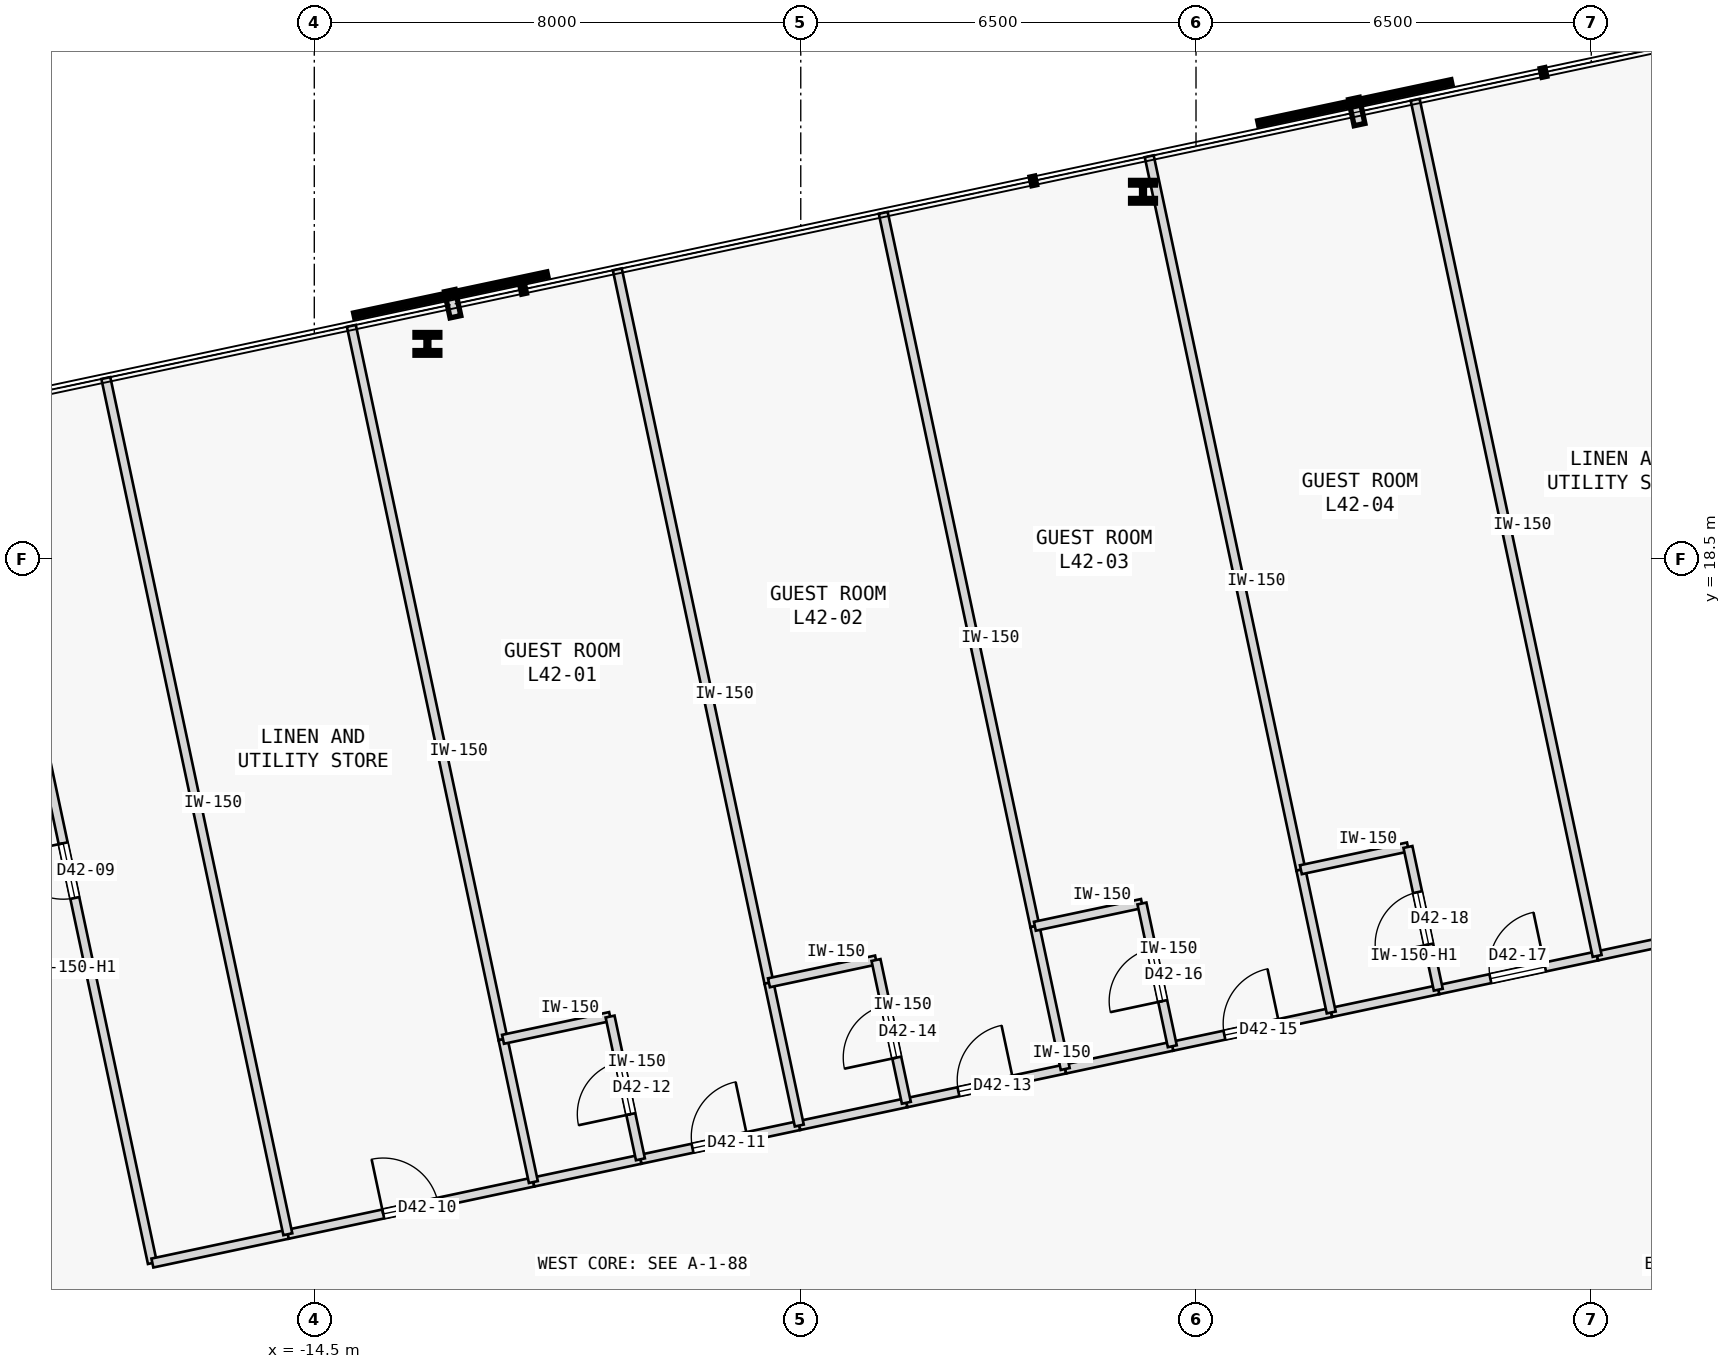
"""IFC4 building model, lengths in metres.
Left out: names, types, materials, properties, quantities, classifications, styles, units other than length and angle.
Written with IfcOpenShell. Run it as: python <this file> out.ifc"""

import sys

from ifc_helpers import new_model, si_unit, direction, frame, frame_2d, origin, origin_2d, place, context, subcontext, project, spatial, rectangle, i_section, extrude, element, fill, save


model = new_model("IFC4")
c1 = context("Model", 3, precision=1e-05, world=origin(), true_north=direction((0.0, 1.0)))
c2 = subcontext(c1, "Body", "Model", "MODEL_VIEW")
j1 = project(units=[si_unit("LENGTHUNIT", "METRE"), si_unit("PLANEANGLEUNIT", "RADIAN")], contexts=[c1])
p1 = place(None, origin())
s1 = spatial("IfcSite", under=j1, at=p1, CompositionType="ELEMENT")
p2 = place(p1, origin())
s2 = spatial("IfcBuilding", under=s1, at=p2, CompositionType="ELEMENT")
p3 = place(p2, frame((0.0, 0.0, 165.0)))
s3 = spatial("IfcBuildingStorey", under=s2, at=p3, CompositionType="ELEMENT", Elevation=165.0)
for number, where, z_axis, x_axis in (
    (1, (-0.872, 24.543, 0.0), (0.0, 0.0, 1.0), (1.0, 0.0, 0.0)),
    (2, (-12.64, 22.042, 0.0), (0.0, 0.0, 1.0), (1.0, 0.0, 0.0)),
):
    element("IfcColumn", number, at=place(p3, frame(where, z_axis=z_axis, x_axis=x_axis)), inside=s3, PredefinedType="COLUMN", context=c2, shape_type="SweptSolid", body=[
        extrude(i_section(OverallWidth=0.409, OverallDepth=0.374, WebThickness=0.048, FlangeThickness=0.077, FilletRadius=0.015, at=origin_2d()), origin(), (0.0, 0.0, 1.0), 3.4),
    ])
p4 = place(p3, frame((-17.162, 6.926, 0.0), z_axis=(0.0, 0.0, 1.0), x_axis=(-0.207911421929, 0.978147657888, 0.0)))
e3 = element("IfcWall", 3, at=p4, inside=s3, PredefinedType="PARTITIONING", context=c2, shape_type="SweptSolid", body=[
    extrude(rectangle(XDim=13.195, YDim=0.15, at=frame_2d((6.598, 0.0))), origin(), (0.0, 0.0, 1.0), 2.725),
])
p5 = place(p4, frame((6.137, 0.0, 0.0)))
e4 = element("IfcOpeningElement", 4, at=p5, cuts=e3, PredefinedType="OPENING", context=c2, shape_type="SweptSolid", body=[
    extrude(rectangle(XDim=0.92, YDim=2.15, at=frame_2d((0.46, 1.075))), frame((0.0, 0.085, 0.0), z_axis=(0.0, -1.0, 0.0), x_axis=(1.0, 0.0, 0.0)), (0.0, 0.0, 1.0), 0.17),
])
p6 = place(p3, frame((-17.162, 6.926, 0.0), z_axis=(0.0, 0.0, 1.0), x_axis=(0.978124500572, 0.208020338863, 0.0)))
e5 = element("IfcWall", 5, at=p6, inside=s3, PredefinedType="PARTITIONING", context=c2, shape_type="SweptSolid", body=[
    extrude(rectangle(XDim=2.277, YDim=0.15, at=frame_2d((1.138, 0.0))), origin(), (0.0, 0.0, 1.0), 3.175),
])
p7 = place(p3, frame((-14.935, 7.399, 0.0), z_axis=(0.0, 0.0, 1.0), x_axis=(0.978153289129, 0.20788492722, 0.0)))
e6 = element("IfcWall", 6, at=p7, inside=s3, PredefinedType="PARTITIONING", context=c2, shape_type="SweptSolid", body=[
    extrude(rectangle(XDim=4.128, YDim=0.15, at=frame_2d((2.064, 0.0))), origin(), (0.0, 0.0, 1.0), 3.175),
])
p8 = place(p7, frame((1.604, 0.0, 0.0)))
e7 = element("IfcOpeningElement", 7, at=p8, cuts=e6, PredefinedType="OPENING", context=c2, shape_type="SweptSolid", body=[
    extrude(rectangle(XDim=0.92, YDim=2.15, at=frame_2d((0.46, 1.075))), frame((0.0, 0.085, 0.0), z_axis=(0.0, -1.0, 0.0), x_axis=(1.0, 0.0, 0.0)), (0.0, 0.0, 1.0), 0.17),
])
p9 = place(p3, frame((-9.137, 8.632, 0.0), z_axis=(0.0, 0.0, 1.0), x_axis=(0.978158153975, 0.207862035524, 0.0)))
e8 = element("IfcWall", 8, at=p9, inside=s3, PredefinedType="PARTITIONING", context=c2, shape_type="SweptSolid", body=[
    extrude(rectangle(XDim=2.671, YDim=0.15, at=frame_2d((1.335, 0.0))), origin(), (0.0, 0.0, 1.0), 3.175),
])
p10 = place(p9, frame((0.875, 0.0, 0.0)))
e9 = element("IfcOpeningElement", 9, at=p10, cuts=e8, PredefinedType="OPENING", context=c2, shape_type="SweptSolid", body=[
    extrude(rectangle(XDim=0.92, YDim=2.15, at=frame_2d((0.46, 1.075))), frame((0.0, 0.085, 0.0), z_axis=(0.0, -1.0, 0.0), x_axis=(1.0, 0.0, 0.0)), (0.0, 0.0, 1.0), 0.17),
])
p11 = place(p3, frame((-10.897, 8.258, 0.0), z_axis=(0.0, 0.0, 1.0), x_axis=(0.978146440129, 0.207917150959, 0.0)))
e10 = element("IfcWall", 10, at=p11, inside=s3, PredefinedType="PARTITIONING", context=c2, shape_type="SweptSolid", body=[
    extrude(rectangle(XDim=1.8, YDim=0.15, at=frame_2d((0.9, 0.0))), origin(), (0.0, 0.0, 1.0), 3.175),
])
p12 = place(p3, frame((-4.763, 9.561, 0.0), z_axis=(0.0, 0.0, 1.0), x_axis=(0.978139565144, 0.207949491702, 0.0)))
e11 = element("IfcWall", 11, at=p12, inside=s3, PredefinedType="PARTITIONING", context=c2, shape_type="SweptSolid", body=[
    extrude(rectangle(XDim=2.671, YDim=0.15, at=frame_2d((1.335, 0.0))), origin(), (0.0, 0.0, 1.0), 3.175),
])
p13 = place(p12, frame((0.875, 0.0, 0.0)))
e12 = element("IfcOpeningElement", 12, at=p13, cuts=e11, PredefinedType="OPENING", context=c2, shape_type="SweptSolid", body=[
    extrude(rectangle(XDim=0.92, YDim=2.15, at=frame_2d((0.46, 1.075))), frame((0.0, 0.085, 0.0), z_axis=(0.0, -1.0, 0.0), x_axis=(1.0, 0.0, 0.0)), (0.0, 0.0, 1.0), 0.17),
])
p14 = place(p3, frame((-6.524, 9.187, 0.0), z_axis=(0.0, 0.0, 1.0), x_axis=(0.978146440129, 0.207917150959, 0.0)))
e13 = element("IfcWall", 13, at=p14, inside=s3, PredefinedType="PARTITIONING", context=c2, shape_type="SweptSolid", body=[
    extrude(rectangle(XDim=1.8, YDim=0.15, at=frame_2d((0.9, 0.0))), origin(), (0.0, 0.0, 1.0), 3.175),
])
p15 = place(p3, frame((-0.39, 10.491, 0.0), z_axis=(0.0, 0.0, 1.0), x_axis=(0.978155367406, 0.207875148141, 0.0)))
e14 = element("IfcWall", 14, at=p15, inside=s3, PredefinedType="PARTITIONING", context=c2, shape_type="SweptSolid", body=[
    extrude(rectangle(XDim=2.672, YDim=0.15, at=frame_2d((1.336, 0.0))), origin(), (0.0, 0.0, 1.0), 3.175),
])
p16 = place(p15, frame((0.876, 0.0, 0.0)))
e15 = element("IfcOpeningElement", 15, at=p16, cuts=e14, PredefinedType="OPENING", context=c2, shape_type="SweptSolid", body=[
    extrude(rectangle(XDim=0.92, YDim=2.15, at=frame_2d((0.46, 1.075))), frame((0.0, 0.085, 0.0), z_axis=(0.0, -1.0, 0.0), x_axis=(1.0, 0.0, 0.0)), (0.0, 0.0, 1.0), 0.17),
])
p17 = place(p3, frame((-2.151, 10.117, 0.0), z_axis=(0.0, 0.0, 1.0), x_axis=(0.978146440129, 0.207917150959, 0.0)))
e16 = element("IfcWall", 16, at=p17, inside=s3, PredefinedType="PARTITIONING", context=c2, shape_type="SweptSolid", body=[
    extrude(rectangle(XDim=1.8, YDim=0.15, at=frame_2d((0.9, 0.0))), origin(), (0.0, 0.0, 1.0), 3.175),
])
p18 = place(p3, frame((3.984, 11.421, 0.0), z_axis=(0.0, 0.0, 1.0), x_axis=(0.978139565144, 0.207949491702, 0.0)))
e17 = element("IfcWall", 17, at=p18, inside=s3, PredefinedType="PARTITIONING", context=c2, shape_type="SweptSolid", body=[
    extrude(rectangle(XDim=2.671, YDim=0.15, at=frame_2d((1.335, 0.0))), origin(), (0.0, 0.0, 1.0), 3.175),
])
p19 = place(p18, frame((0.875, 0.0, 0.0)))
e18 = element("IfcOpeningElement", 18, at=p19, cuts=e17, PredefinedType="OPENING", context=c2, shape_type="SweptSolid", body=[
    extrude(rectangle(XDim=0.92, YDim=2.15, at=frame_2d((0.46, 1.075))), frame((0.0, 0.085, 0.0), z_axis=(0.0, -1.0, 0.0), x_axis=(1.0, 0.0, 0.0)), (0.0, 0.0, 1.0), 0.17),
])
p20 = place(p3, frame((2.223, 11.046, 0.0), z_axis=(0.0, 0.0, 1.0), x_axis=(0.978146440129, 0.207917150959, 0.0)))
e19 = element("IfcWall", 19, at=p20, inside=s3, PredefinedType="PARTITIONING", context=c2, shape_type="SweptSolid", body=[
    extrude(rectangle(XDim=1.8, YDim=0.15, at=frame_2d((0.9, 0.0))), origin(), (0.0, 0.0, 1.0), 3.175),
])
p21 = place(p3, frame((6.597, 11.976, 0.0), z_axis=(0.0, 0.0, 1.0), x_axis=(0.978155092113, 0.207876443525, 0.0)))
e20 = element("IfcWall", 20, at=p21, inside=s3, PredefinedType="PARTITIONING", context=c2, shape_type="SweptSolid", body=[
    extrude(rectangle(XDim=4.127, YDim=0.15, at=frame_2d((2.063, 0.0))), origin(), (0.0, 0.0, 1.0), 3.175),
])
p22 = place(p21, frame((1.604, 0.0, 0.0)))
e21 = element("IfcOpeningElement", 21, at=p22, cuts=e20, PredefinedType="OPENING", context=c2, shape_type="SweptSolid", body=[
    extrude(rectangle(XDim=0.92, YDim=2.15, at=frame_2d((0.46, 1.075))), frame((0.0, 0.085, 0.0), z_axis=(0.0, -1.0, 0.0), x_axis=(1.0, 0.0, 0.0)), (0.0, 0.0, 1.0), 0.17),
])
p23 = place(p3, frame((-18.207, 1.74, 0.0), z_axis=(0.0, 0.0, 1.0), x_axis=(-0.20793874598, 0.97814184959, 0.0)))
e22 = element("IfcWall", 22, at=p23, inside=s3, PredefinedType="PARTITIONING", context=c2, shape_type="SweptSolid", body=[
    extrude(rectangle(XDim=4.855, YDim=0.15, at=frame_2d((2.427, 0.0))), origin(), (0.0, 0.0, 1.0), 3.175),
])
p24 = place(p23, frame((1.952, 0.0, 0.0)))
e23 = element("IfcOpeningElement", 23, at=p24, cuts=e22, PredefinedType="OPENING", context=c2, shape_type="SweptSolid", body=[
    extrude(rectangle(XDim=0.95, YDim=2.15, at=frame_2d((0.475, 1.075))), frame((0.0, 0.085, 0.0), z_axis=(0.0, -1.0, 0.0), x_axis=(1.0, 0.0, 0.0)), (0.0, 0.0, 1.0), 0.17),
])
p25 = place(p3, frame((-14.935, 7.399, 0.0), z_axis=(0.0, 0.0, 1.0), x_axis=(-0.207899121568, 0.978150272326, 0.0)))
e24 = element("IfcWall", 24, at=p25, inside=s3, PredefinedType="PARTITIONING", context=c2, shape_type="SweptSolid", body=[
    extrude(rectangle(XDim=14.395, YDim=0.15, at=frame_2d((7.197, 0.0))), origin(), (0.0, 0.0, 1.0), 3.175),
])
p26 = place(p3, frame((-11.396, 10.605, 0.0), z_axis=(0.0, 0.0, 1.0), x_axis=(-0.207910848762, 0.978147779718, 0.0)))
e25 = element("IfcWall", 25, at=p26, inside=s3, PredefinedType="PARTITIONING", context=c2, shape_type="SweptSolid", body=[
    extrude(rectangle(XDim=11.995, YDim=0.15, at=frame_2d((5.998, 0.0))), origin(), (0.0, 0.0, 1.0), 3.175),
])
p27 = place(p3, frame((-10.897, 8.258, 0.0), z_axis=(0.0, 0.0, 1.0), x_axis=(-0.207937840262, 0.978142042133, 0.0)))
e26 = element("IfcWall", 26, at=p27, inside=s3, PredefinedType="PARTITIONING", context=c2, shape_type="SweptSolid", body=[
    extrude(rectangle(XDim=2.4, YDim=0.15, at=frame_2d((1.2, 0.0))), origin(), (0.0, 0.0, 1.0), 3.175),
])
p28 = place(p3, frame((-11.396, 10.605, 0.0), z_axis=(0.0, 0.0, 1.0), x_axis=(0.978118849246, 0.208046909975, 0.0)))
e27 = element("IfcWall", 27, at=p28, inside=s3, PredefinedType="PARTITIONING", context=c2, shape_type="SweptSolid", body=[
    extrude(rectangle(XDim=1.8, YDim=0.15, at=frame_2d((0.9, 0.0))), origin(), (0.0, 0.0, 1.0), 3.175),
])
p29 = place(p3, frame((-9.137, 8.632, 0.0), z_axis=(0.0, 0.0, 1.0), x_axis=(-0.207917150959, 0.978146440129, 0.0)))
e28 = element("IfcWall", 28, at=p29, inside=s3, PredefinedType="PARTITIONING", context=c2, shape_type="SweptSolid", body=[
    extrude(rectangle(XDim=2.4, YDim=0.15, at=frame_2d((1.2, 0.0))), origin(), (0.0, 0.0, 1.0), 3.175),
])
p30 = place(p29, frame((0.76, 0.0, 0.0)))
e29 = element("IfcOpeningElement", 29, at=p30, cuts=e28, PredefinedType="OPENING", context=c2, shape_type="SweptSolid", body=[
    extrude(rectangle(XDim=0.88, YDim=2.15, at=frame_2d((0.44, 1.075))), frame((0.0, 0.085, 0.0), z_axis=(0.0, -1.0, 0.0), x_axis=(1.0, 0.0, 0.0)), (0.0, 0.0, 1.0), 0.17),
])
p31 = place(p3, frame((-7.023, 11.535, 0.0), z_axis=(0.0, 0.0, 1.0), x_axis=(-0.207910848762, 0.978147779718, 0.0)))
e30 = element("IfcWall", 30, at=p31, inside=s3, PredefinedType="PARTITIONING", context=c2, shape_type="SweptSolid", body=[
    extrude(rectangle(XDim=11.995, YDim=0.15, at=frame_2d((5.998, 0.0))), origin(), (0.0, 0.0, 1.0), 3.175),
])
p32 = place(p3, frame((-6.524, 9.187, 0.0), z_axis=(0.0, 0.0, 1.0), x_axis=(-0.207917150959, 0.978146440129, 0.0)))
e31 = element("IfcWall", 31, at=p32, inside=s3, PredefinedType="PARTITIONING", context=c2, shape_type="SweptSolid", body=[
    extrude(rectangle(XDim=2.4, YDim=0.15, at=frame_2d((1.2, 0.0))), origin(), (0.0, 0.0, 1.0), 3.175),
])
p33 = place(p3, frame((-7.023, 11.535, 0.0), z_axis=(0.0, 0.0, 1.0), x_axis=(0.978146440129, 0.207917150959, 0.0)))
e32 = element("IfcWall", 32, at=p33, inside=s3, PredefinedType="PARTITIONING", context=c2, shape_type="SweptSolid", body=[
    extrude(rectangle(XDim=1.8, YDim=0.15, at=frame_2d((0.9, 0.0))), origin(), (0.0, 0.0, 1.0), 3.175),
])
p34 = place(p3, frame((-4.763, 9.561, 0.0), z_axis=(0.0, 0.0, 1.0), x_axis=(-0.207917150959, 0.978146440129, 0.0)))
e33 = element("IfcWall", 33, at=p34, inside=s3, PredefinedType="PARTITIONING", context=c2, shape_type="SweptSolid", body=[
    extrude(rectangle(XDim=2.4, YDim=0.15, at=frame_2d((1.2, 0.0))), origin(), (0.0, 0.0, 1.0), 3.175),
])
p35 = place(p34, frame((0.76, 0.0, 0.0)))
e34 = element("IfcOpeningElement", 34, at=p35, cuts=e33, PredefinedType="OPENING", context=c2, shape_type="SweptSolid", body=[
    extrude(rectangle(XDim=0.88, YDim=2.15, at=frame_2d((0.44, 1.075))), frame((0.0, 0.085, 0.0), z_axis=(0.0, -1.0, 0.0), x_axis=(1.0, 0.0, 0.0)), (0.0, 0.0, 1.0), 0.17),
])
p36 = place(p3, frame((-2.65, 12.464, 0.0), z_axis=(0.0, 0.0, 1.0), x_axis=(-0.207914988081, 0.978146899873, 0.0)))
e35 = element("IfcWall", 35, at=p36, inside=s3, PredefinedType="PARTITIONING", context=c2, shape_type="SweptSolid", body=[
    extrude(rectangle(XDim=11.995, YDim=0.15, at=frame_2d((5.998, 0.0))), origin(), (0.0, 0.0, 1.0), 3.175),
])
p37 = place(p3, frame((-2.151, 10.117, 0.0), z_axis=(0.0, 0.0, 1.0), x_axis=(-0.207917150959, 0.978146440129, 0.0)))
e36 = element("IfcWall", 36, at=p37, inside=s3, PredefinedType="PARTITIONING", context=c2, shape_type="SweptSolid", body=[
    extrude(rectangle(XDim=2.4, YDim=0.15, at=frame_2d((1.2, 0.0))), origin(), (0.0, 0.0, 1.0), 3.175),
])
p38 = place(p3, frame((-2.65, 12.464, 0.0), z_axis=(0.0, 0.0, 1.0), x_axis=(0.978174015353, 0.207787380965, 0.0)))
e37 = element("IfcWall", 37, at=p38, inside=s3, PredefinedType="PARTITIONING", context=c2, shape_type="SweptSolid", body=[
    extrude(rectangle(XDim=1.8, YDim=0.15, at=frame_2d((0.9, 0.0))), origin(), (0.0, 0.0, 1.0), 3.175),
])
p39 = place(p3, frame((-0.39, 10.491, 0.0), z_axis=(0.0, 0.0, 1.0), x_axis=(-0.207937840262, 0.978142042133, 0.0)))
e38 = element("IfcWall", 38, at=p39, inside=s3, PredefinedType="PARTITIONING", context=c2, shape_type="SweptSolid", body=[
    extrude(rectangle(XDim=2.4, YDim=0.15, at=frame_2d((1.2, 0.0))), origin(), (0.0, 0.0, 1.0), 3.175),
])
p40 = place(p39, frame((0.76, 0.0, 0.0)))
e39 = element("IfcOpeningElement", 39, at=p40, cuts=e38, PredefinedType="OPENING", context=c2, shape_type="SweptSolid", body=[
    extrude(rectangle(XDim=0.88, YDim=2.15, at=frame_2d((0.44, 1.075))), frame((0.0, 0.085, 0.0), z_axis=(0.0, -1.0, 0.0), x_axis=(1.0, 0.0, 0.0)), (0.0, 0.0, 1.0), 0.17),
])
p41 = place(p3, frame((1.725, 13.394, 0.0), z_axis=(0.0, 0.0, 1.0), x_axis=(-0.207910848762, 0.978147779718, 0.0)))
e40 = element("IfcWall", 40, at=p41, inside=s3, PredefinedType="PARTITIONING", context=c2, shape_type="SweptSolid", body=[
    extrude(rectangle(XDim=11.995, YDim=0.15, at=frame_2d((5.998, 0.0))), origin(), (0.0, 0.0, 1.0), 3.175),
])
p42 = place(p3, frame((2.223, 11.046, 0.0), z_axis=(0.0, 0.0, 1.0), x_axis=(-0.207819824493, 0.978167123015, 0.0)))
e41 = element("IfcWall", 41, at=p42, inside=s3, PredefinedType="PARTITIONING", context=c2, shape_type="SweptSolid", body=[
    extrude(rectangle(XDim=2.4, YDim=0.15, at=frame_2d((1.2, 0.0))), origin(), (0.0, 0.0, 1.0), 3.175),
])
p43 = place(p3, frame((1.725, 13.394, 0.0), z_axis=(0.0, 0.0, 1.0), x_axis=(0.978140575842, 0.207944737591, 0.0)))
e42 = element("IfcWall", 42, at=p43, inside=s3, PredefinedType="PARTITIONING", context=c2, shape_type="SweptSolid", body=[
    extrude(rectangle(XDim=1.8, YDim=0.15, at=frame_2d((0.9, 0.0))), origin(), (0.0, 0.0, 1.0), 3.175),
])
p44 = place(p3, frame((3.984, 11.421, 0.0), z_axis=(0.0, 0.0, 1.0), x_axis=(-0.207917150959, 0.978146440129, 0.0)))
e43 = element("IfcWall", 43, at=p44, inside=s3, PredefinedType="PARTITIONING", context=c2, shape_type="SweptSolid", body=[
    extrude(rectangle(XDim=2.4, YDim=0.15, at=frame_2d((1.2, 0.0))), origin(), (0.0, 0.0, 1.0), 2.725),
])
p45 = place(p44, frame((0.76, 0.0, 0.0)))
e44 = element("IfcOpeningElement", 44, at=p45, cuts=e43, PredefinedType="OPENING", context=c2, shape_type="SweptSolid", body=[
    extrude(rectangle(XDim=0.88, YDim=2.15, at=frame_2d((0.44, 1.075))), frame((0.0, 0.085, 0.0), z_axis=(0.0, -1.0, 0.0), x_axis=(1.0, 0.0, 0.0)), (0.0, 0.0, 1.0), 0.17),
])
p46 = place(p3, frame((6.597, 11.976, 0.0), z_axis=(0.0, 0.0, 1.0), x_axis=(-0.207899121568, 0.978150272326, 0.0)))
e45 = element("IfcWall", 45, at=p46, inside=s3, PredefinedType="PARTITIONING", context=c2, shape_type="SweptSolid", body=[
    extrude(rectangle(XDim=14.395, YDim=0.15, at=frame_2d((7.197, 0.0))), origin(), (0.0, 0.0, 1.0), 3.175),
])
p47 = place(p5, origin())
e46 = element("IfcDoor", 46, at=p47, inside=s3, OperationType="SINGLE_SWING_RIGHT", PredefinedType="DOOR", context=c2, shape_type="SweptSolid", body=[
    extrude(rectangle(XDim=0.92, YDim=2.15, at=frame_2d((0.46, 1.075))), frame((0.0, 0.025, 0.0), z_axis=(0.0, -1.0, 0.0), x_axis=(1.0, 0.0, 0.0)), (0.0, 0.0, 1.0), 0.05),
])
fill(e4, e46)
p48 = place(p8, origin())
e47 = element("IfcDoor", 47, at=p48, inside=s3, OperationType="SINGLE_SWING_LEFT", PredefinedType="DOOR", context=c2, shape_type="SweptSolid", body=[
    extrude(rectangle(XDim=0.92, YDim=2.15, at=frame_2d((0.46, 1.075))), frame((0.0, 0.025, 0.0), z_axis=(0.0, -1.0, 0.0), x_axis=(1.0, 0.0, 0.0)), (0.0, 0.0, 1.0), 0.05),
])
fill(e7, e47)
p49 = place(p10, origin())
e48 = element("IfcDoor", 48, at=p49, inside=s3, OperationType="SINGLE_SWING_RIGHT", PredefinedType="DOOR", context=c2, shape_type="SweptSolid", body=[
    extrude(rectangle(XDim=0.92, YDim=2.15, at=frame_2d((0.46, 1.075))), frame((0.0, 0.025, 0.0), z_axis=(0.0, -1.0, 0.0), x_axis=(1.0, 0.0, 0.0)), (0.0, 0.0, 1.0), 0.05),
])
fill(e9, e48)
p50 = place(p30, origin())
e49 = element("IfcDoor", 49, at=p50, inside=s3, OperationType="SINGLE_SWING_LEFT", PredefinedType="DOOR", context=c2, shape_type="SweptSolid", body=[
    extrude(rectangle(XDim=0.88, YDim=2.15, at=frame_2d((0.44, 1.075))), frame((0.0, 0.025, 0.0), z_axis=(0.0, -1.0, 0.0), x_axis=(1.0, 0.0, 0.0)), (0.0, 0.0, 1.0), 0.05),
])
fill(e29, e49)
p51 = place(p13, origin())
e50 = element("IfcDoor", 50, at=p51, inside=s3, OperationType="SINGLE_SWING_RIGHT", PredefinedType="DOOR", context=c2, shape_type="SweptSolid", body=[
    extrude(rectangle(XDim=0.92, YDim=2.15, at=frame_2d((0.46, 1.075))), frame((0.0, 0.025, 0.0), z_axis=(0.0, -1.0, 0.0), x_axis=(1.0, 0.0, 0.0)), (0.0, 0.0, 1.0), 0.05),
])
fill(e12, e50)
p52 = place(p35, origin())
e51 = element("IfcDoor", 51, at=p52, inside=s3, OperationType="SINGLE_SWING_LEFT", PredefinedType="DOOR", context=c2, shape_type="SweptSolid", body=[
    extrude(rectangle(XDim=0.88, YDim=2.15, at=frame_2d((0.44, 1.075))), frame((0.0, 0.025, 0.0), z_axis=(0.0, -1.0, 0.0), x_axis=(1.0, 0.0, 0.0)), (0.0, 0.0, 1.0), 0.05),
])
fill(e34, e51)
p53 = place(p16, origin())
e52 = element("IfcDoor", 52, at=p53, inside=s3, OperationType="SINGLE_SWING_RIGHT", PredefinedType="DOOR", context=c2, shape_type="SweptSolid", body=[
    extrude(rectangle(XDim=0.92, YDim=2.15, at=frame_2d((0.46, 1.075))), frame((0.0, 0.025, 0.0), z_axis=(0.0, -1.0, 0.0), x_axis=(1.0, 0.0, 0.0)), (0.0, 0.0, 1.0), 0.05),
])
fill(e15, e52)
p54 = place(p40, origin())
e53 = element("IfcDoor", 53, at=p54, inside=s3, OperationType="SINGLE_SWING_LEFT", PredefinedType="DOOR", context=c2, shape_type="SweptSolid", body=[
    extrude(rectangle(XDim=0.88, YDim=2.15, at=frame_2d((0.44, 1.075))), frame((0.0, 0.025, 0.0), z_axis=(0.0, -1.0, 0.0), x_axis=(1.0, 0.0, 0.0)), (0.0, 0.0, 1.0), 0.05),
])
fill(e39, e53)
p55 = place(p19, origin())
e54 = element("IfcDoor", 54, at=p55, inside=s3, OperationType="SINGLE_SWING_RIGHT", PredefinedType="DOOR", context=c2, shape_type="SweptSolid", body=[
    extrude(rectangle(XDim=0.92, YDim=2.15, at=frame_2d((0.46, 1.075))), frame((0.0, 0.025, 0.0), z_axis=(0.0, -1.0, 0.0), x_axis=(1.0, 0.0, 0.0)), (0.0, 0.0, 1.0), 0.05),
])
fill(e18, e54)
p56 = place(p45, origin())
e55 = element("IfcDoor", 55, at=p56, inside=s3, OperationType="SINGLE_SWING_LEFT", PredefinedType="DOOR", context=c2, shape_type="SweptSolid", body=[
    extrude(rectangle(XDim=0.88, YDim=2.15, at=frame_2d((0.44, 1.075))), frame((0.0, 0.025, 0.0), z_axis=(0.0, -1.0, 0.0), x_axis=(1.0, 0.0, 0.0)), (0.0, 0.0, 1.0), 0.05),
])
fill(e44, e55)
save(model, sys.argv[1])
